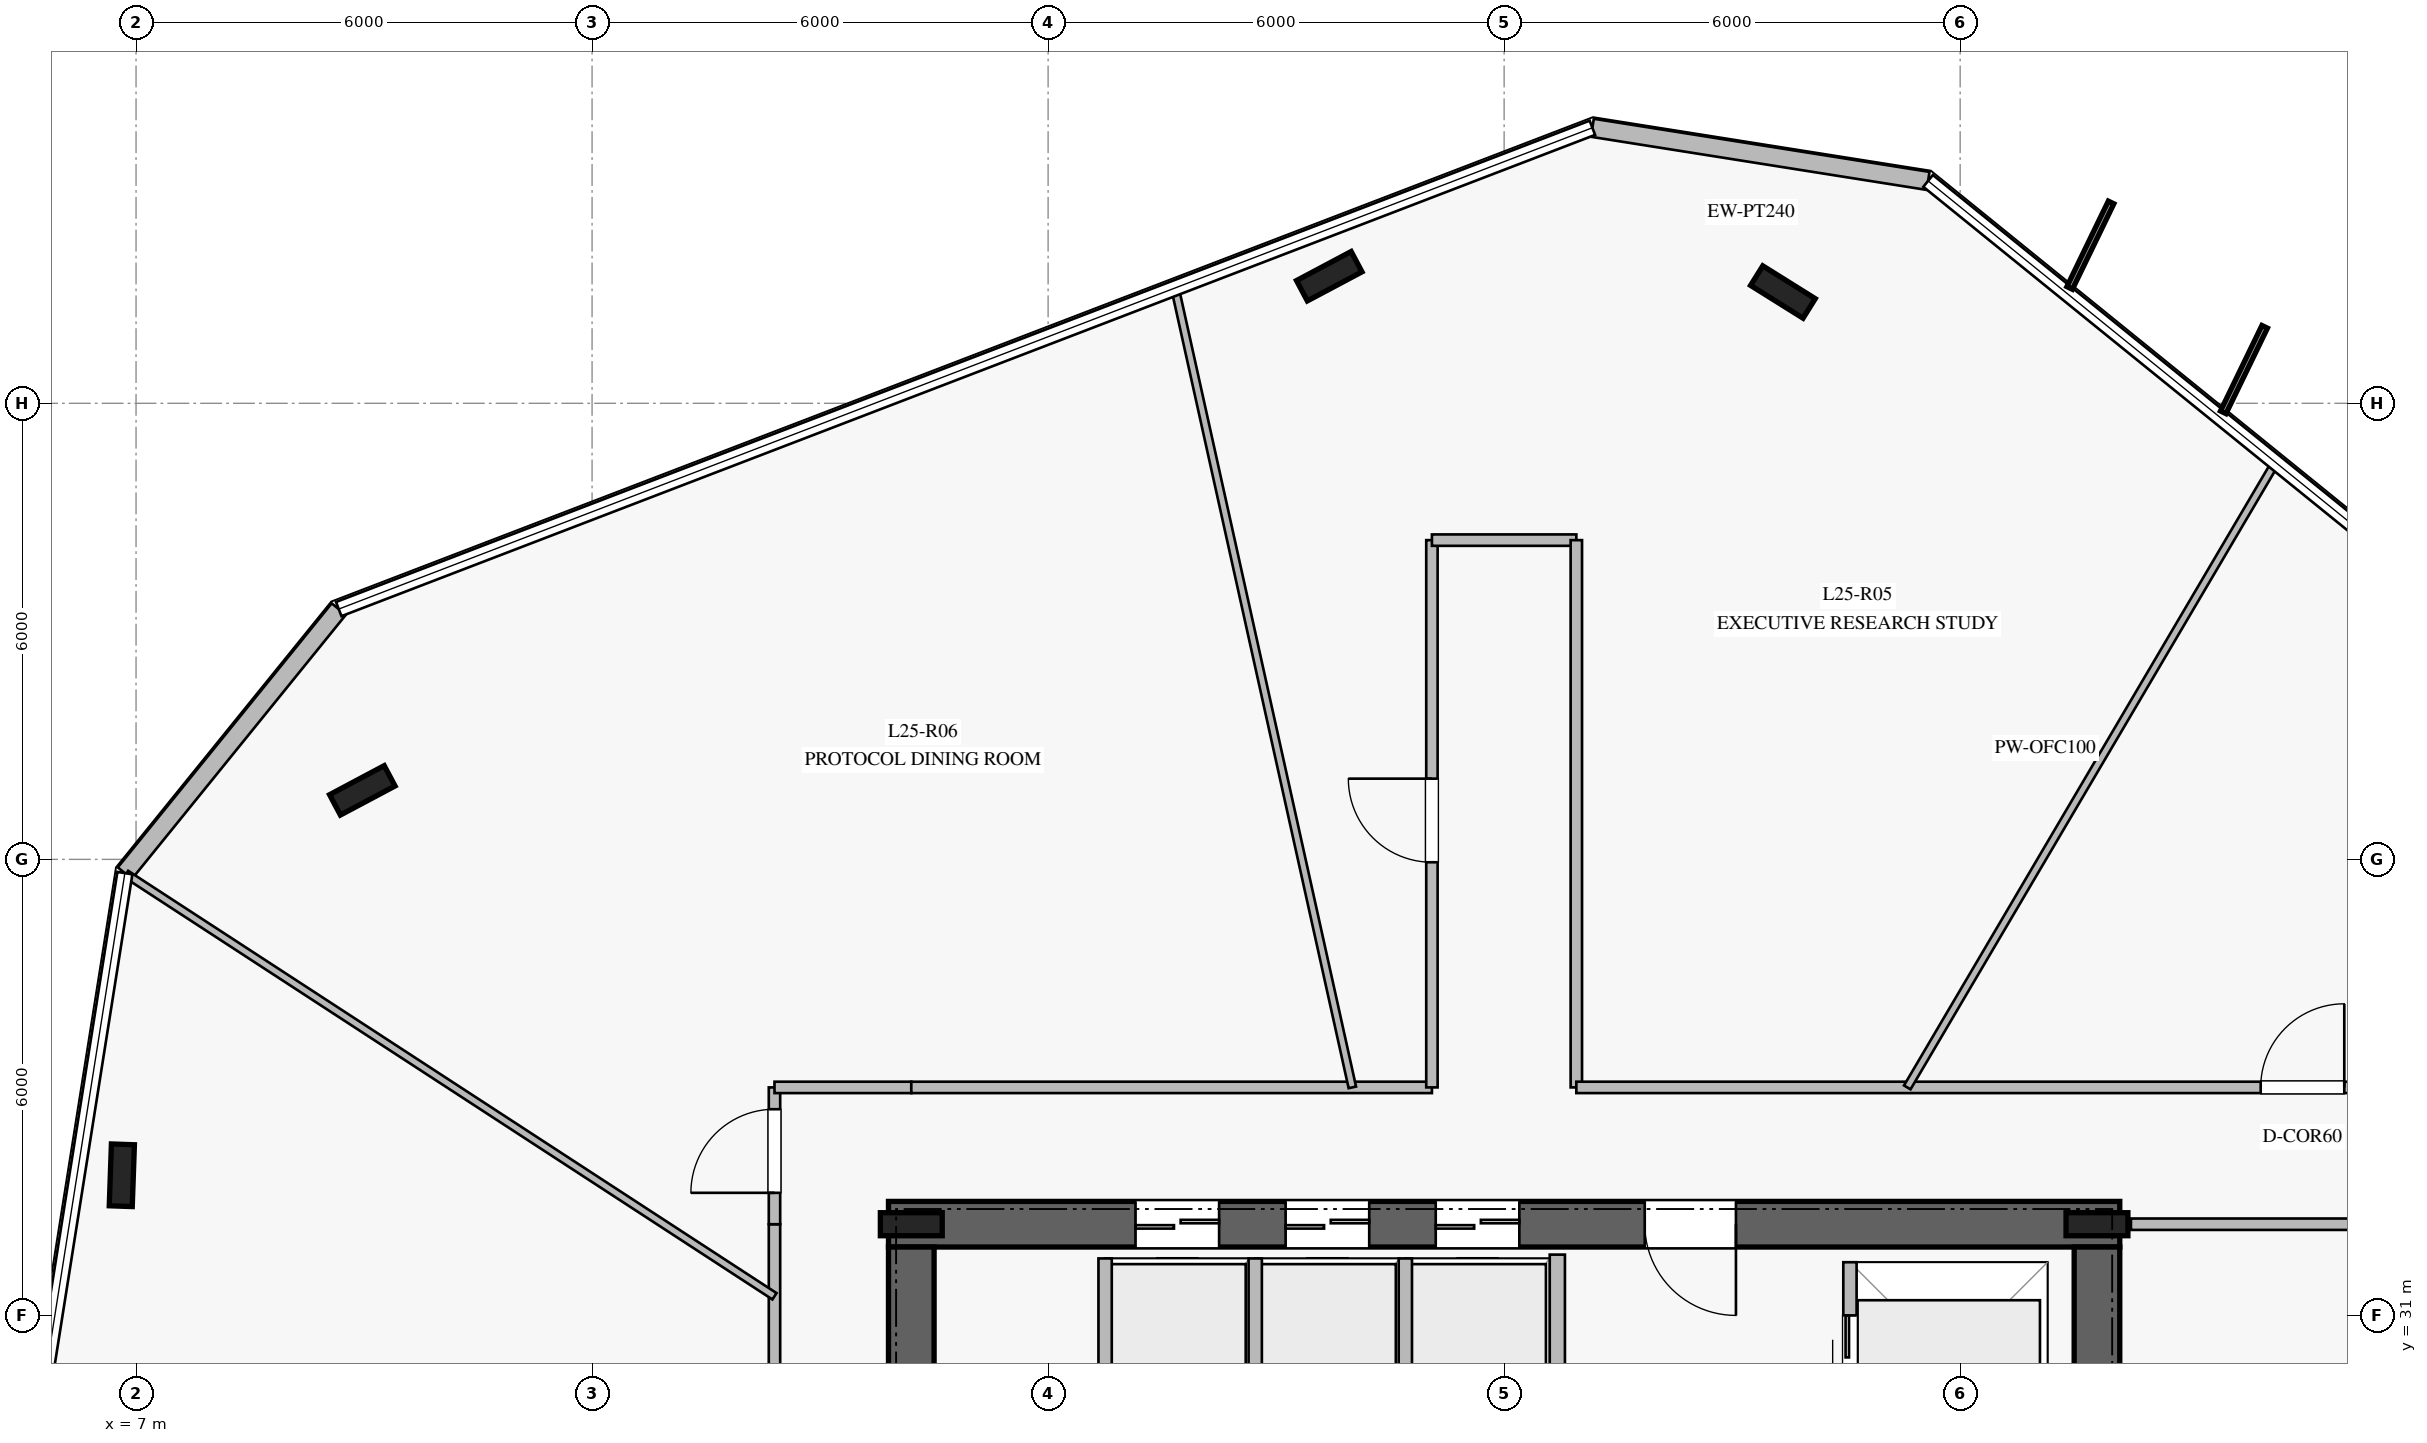
"""IFC4 building model, lengths in metres.
Left out: names, types, materials, properties, quantities, classifications, styles, units other than length and angle.
Written with IfcOpenShell. Run it as: python <this file> out.ifc"""

import sys

from ifc_helpers import new_model, si_unit, direction, frame, frame_2d, origin, origin_2d, place, context, subcontext, project, spatial, rectangle, i_section, extrude, element, fill, save


model = new_model("IFC4")
c1 = context("Model", 3, precision=1e-05, world=origin(), true_north=direction((0.0, 1.0)))
c2 = subcontext(c1, "Body", "Model", "MODEL_VIEW")
j1 = project(units=[si_unit("LENGTHUNIT", "METRE"), si_unit("PLANEANGLEUNIT", "RADIAN")], contexts=[c1])
p1 = place(None, origin())
s1 = spatial("IfcSite", under=j1, at=p1, CompositionType="ELEMENT")
p2 = place(p1, origin())
s2 = spatial("IfcBuilding", under=s1, at=p2, CompositionType="ELEMENT")
p3 = place(p2, frame((0.0, 0.0, 106.4)))
s3 = spatial("IfcBuildingStorey", under=s2, at=p3, CompositionType="ELEMENT", Elevation=106.4)
p4 = place(p3, frame((33.1, 32.2, 0.0), z_axis=(0.0, 0.0, 1.0), x_axis=(-1.0, 0.0, 0.0)))
e1 = element("IfcWall", 1, at=p4, inside=s3, PredefinedType="SHEAR", context=c2, shape_type="SweptSolid", body=[
    extrude(rectangle(XDim=16.2, YDim=0.6, at=frame_2d((8.1, 0.0))), origin(), (0.0, 0.0, 1.0), 3.76),
])
p5 = place(p4, frame((5.05, 0.0, 0.0)))
e2 = element("IfcOpeningElement", 2, at=p5, cuts=e1, PredefinedType="OPENING", context=c2, shape_type="SweptSolid", body=[
    extrude(rectangle(XDim=1.2, YDim=2.25, at=frame_2d((0.6, 1.125))), frame((0.0, 0.31, 0.0), z_axis=(0.0, -1.0, 0.0), x_axis=(1.0, 0.0, 0.0)), (0.0, 0.0, 1.0), 0.62),
])
p6 = place(p4, frame((11.85, 0.0, 0.0)))
e3 = element("IfcOpeningElement", 3, at=p6, cuts=e1, PredefinedType="OPENING", context=c2, shape_type="SweptSolid", body=[
    extrude(rectangle(XDim=1.1, YDim=2.2, at=frame_2d((0.55, 1.1))), frame((0.0, 0.31, 0.0), z_axis=(0.0, -1.0, 0.0), x_axis=(1.0, 0.0, 0.0)), (0.0, 0.0, 1.0), 0.62),
])
p7 = place(p4, frame((9.875, 0.0, 0.0)))
e4 = element("IfcOpeningElement", 4, at=p7, cuts=e1, PredefinedType="OPENING", context=c2, shape_type="SweptSolid", body=[
    extrude(rectangle(XDim=1.1, YDim=2.2, at=frame_2d((0.55, 1.1))), frame((0.0, 0.31, 0.0), z_axis=(0.0, -1.0, 0.0), x_axis=(1.0, 0.0, 0.0)), (0.0, 0.0, 1.0), 0.62),
])
p8 = place(p4, frame((7.9, 0.0, 0.0)))
e5 = element("IfcOpeningElement", 5, at=p8, cuts=e1, PredefinedType="OPENING", context=c2, shape_type="SweptSolid", body=[
    extrude(rectangle(XDim=1.1, YDim=2.2, at=frame_2d((0.55, 1.1))), frame((0.0, 0.31, 0.0), z_axis=(0.0, -1.0, 0.0), x_axis=(1.0, 0.0, 0.0)), (0.0, 0.0, 1.0), 0.62),
])
p9 = place(p3, frame((17.2, 31.9, 0.0), z_axis=(0.0, 0.0, 1.0), x_axis=(0.0, -1.0, 0.0)))
e6 = element("IfcWall", 6, at=p9, inside=s3, PredefinedType="SHEAR", context=c2, shape_type="SweptSolid", body=[
    extrude(rectangle(XDim=13.8, YDim=0.6, at=frame_2d((6.9, 0.0))), origin(), (0.0, 0.0, 1.0), 3.76),
])
p10 = place(p9, frame((2.05, 0.0, 0.0)))
e7 = element("IfcOpeningElement", 7, at=p10, cuts=e6, PredefinedType="OPENING", context=c2, shape_type="SweptSolid", body=[
    extrude(rectangle(XDim=1.5, YDim=2.2, at=frame_2d((0.75, 1.1))), frame((0.0, 0.31, 0.0), z_axis=(0.0, -1.0, 0.0), x_axis=(1.0, 0.0, 0.0)), (0.0, 0.0, 1.0), 0.62),
])
p11 = place(p3, frame((32.8, 18.1, 0.0), z_axis=(0.0, 0.0, 1.0), x_axis=(0.0, 1.0, 0.0)))
e8 = element("IfcWall", 8, at=p11, inside=s3, PredefinedType="SHEAR", context=c2, shape_type="SweptSolid", body=[
    extrude(rectangle(XDim=13.8, YDim=0.6, at=frame_2d((6.9, 0.0))), origin(), (0.0, 0.0, 1.0), 3.76),
])
for number, where, z_axis, x_axis in (
    (9, (32.8, 32.2, 0.0), (0.0, 0.0, 1.0), (1.0, 0.0, 0.0)),
    (10, (17.2, 32.2, 0.0), (0.0, 0.0, 1.0), (1.0, 0.0, 0.0)),
    (11, (28.668, 44.464, 0.0), (0.0, 0.0, 1.0), (-0.848, 0.53, 0.0)),
    (12, (22.699, 44.672, 0.0), (0.0, 0.0, 1.0), (0.883, 0.469, 0.0)),
    (13, (9.977, 37.908, 0.0), (0.0, 0.0, 1.0), (0.883, 0.469, 0.0)),
    (14, (6.813, 32.844, 0.0), (0.0, 0.0, 1.0), (0.035, 0.999, 0.0)),
):
    element("IfcColumn", number, at=place(p3, frame(where, z_axis=z_axis, x_axis=x_axis)), inside=s3, PredefinedType="COLUMN", context=c2, shape_type="SweptSolid", body=[
        extrude(i_section(OverallWidth=0.303, OverallDepth=0.814, WebThickness=0.021, FlangeThickness=0.04, at=origin_2d()), origin(), (0.0, 0.0, 1.0), 4.0),
    ])
p12 = place(p3, frame((30.578, 45.926, 0.0), z_axis=(0.0, 0.0, 1.0), x_axis=(-0.987709346229, 0.156301783012, 0.0)))
e15 = element("IfcWall", 15, at=p12, inside=s3, PredefinedType="STANDARD", context=c2, shape_type="SweptSolid", body=[
    extrude(rectangle(XDim=4.472, YDim=0.24, at=frame_2d((2.236, 0.0))), origin(), (0.0, 0.0, 1.0), 3.76),
])
p13 = place(p3, frame((9.667, 40.293, 0.0), z_axis=(0.0, 0.0, 1.0), x_axis=(-0.629438558802, -0.777050256221, 0.0)))
e16 = element("IfcWall", 16, at=p13, inside=s3, PredefinedType="STANDARD", context=c2, shape_type="SweptSolid", body=[
    extrude(rectangle(XDim=4.471, YDim=0.24, at=frame_2d((2.235, 0.0))), origin(), (0.0, 0.0, 1.0), 3.76),
])
p14 = place(p3, frame((25.7, 26.65, 0.0), z_axis=(0.0, 0.0, 1.0), x_axis=(0.0, 1.0, 0.0)))
e17 = element("IfcWall", 17, at=p14, inside=s3, PredefinedType="PARTITIONING", context=c2, shape_type="SweptSolid", body=[
    extrude(rectangle(XDim=5.15, YDim=0.2, at=frame_2d((2.575, 0.0))), origin(), (0.0, 0.0, 1.0), 3.76),
])
for number, where, z_axis, x_axis in (
    (18, (19.75, 29.4, 0.0), (0.0, 0.0, 1.0), (0.0, 1.0, 0.0)),
    (19, (21.725, 29.4, 0.0), (0.0, 0.0, 1.0), (0.0, 1.0, 0.0)),
    (20, (23.7, 29.4, 0.0), (0.0, 0.0, 1.0), (0.0, 1.0, 0.0)),
):
    element("IfcWall", number, at=place(p3, frame(where, z_axis=z_axis, x_axis=x_axis)), inside=s3, PredefinedType="PARTITIONING", context=c2, shape_type="SweptSolid", body=[
        extrude(rectangle(XDim=2.35, YDim=0.175, at=frame_2d((1.175, 0.0))), origin(), (0.0, 0.0, 1.0), 3.76),
    ])
p15 = place(p3, frame((29.55, 29.1, 0.0), z_axis=(0.0, 0.0, 1.0), x_axis=(0.0, 1.0, 0.0)))
e21 = element("IfcWall", 21, at=p15, inside=s3, PredefinedType="PARTITIONING", context=c2, shape_type="SweptSolid", body=[
    extrude(rectangle(XDim=2.6, YDim=0.175, at=frame_2d((1.3, 0.0))), origin(), (0.0, 0.0, 1.0), 3.76),
])
p16 = place(p15, frame((0.7, 0.0, 0.0)))
e22 = element("IfcOpeningElement", 22, at=p16, cuts=e21, PredefinedType="OPENING", context=c2, shape_type="SweptSolid", body=[
    extrude(rectangle(XDim=1.2, YDim=2.2, at=frame_2d((0.6, 1.1))), frame((0.0, 0.098, 0.0), z_axis=(0.0, -1.0, 0.0), x_axis=(1.0, 0.0, 0.0)), (0.0, 0.0, 1.0), 0.195),
])
p17 = place(p3, frame((15.4, 25.95, 0.0), z_axis=(0.0, 0.0, 1.0), x_axis=(0.0, 1.0, 0.0)))
e23 = element("IfcWall", 23, at=p17, inside=s3, PredefinedType="PARTITIONING", context=c2, shape_type="SweptSolid", body=[
    extrude(rectangle(XDim=6.25, YDim=0.15, at=frame_2d((3.125, 0.0))), origin(), (0.0, 0.0, 1.0), 3.21),
])
p18 = place(p3, frame((15.4, 32.2, 0.0), z_axis=(0.0, 0.0, 1.0), x_axis=(0.0, 1.0, 0.0)))
e24 = element("IfcWall", 24, at=p18, inside=s3, PredefinedType="PARTITIONING", context=c2, shape_type="SweptSolid", body=[
    extrude(rectangle(XDim=1.8, YDim=0.15, at=frame_2d((0.9, 0.0))), origin(), (0.0, 0.0, 1.0), 3.21),
])
p19 = place(p18, frame((0.413, 0.0, 0.0)))
e25 = element("IfcOpeningElement", 25, at=p19, cuts=e24, PredefinedType="OPENING", context=c2, shape_type="SweptSolid", body=[
    extrude(rectangle(XDim=1.1, YDim=2.2, at=frame_2d((0.55, 1.1))), frame((0.0, 0.085, 0.0), z_axis=(0.0, -1.0, 0.0), x_axis=(1.0, 0.0, 0.0)), (0.0, 0.0, 1.0), 0.17),
])
p20 = place(p3, frame((15.4, 34.0, 0.0), z_axis=(0.0, 0.0, 1.0), x_axis=(1.0, 0.0, 0.0)))
e26 = element("IfcWall", 26, at=p20, inside=s3, PredefinedType="PARTITIONING", context=c2, shape_type="SweptSolid", body=[
    extrude(rectangle(XDim=1.8, YDim=0.15, at=frame_2d((0.9, 0.0))), origin(), (0.0, 0.0, 1.0), 3.76),
])
p21 = place(p3, frame((17.2, 34.0, 0.0), z_axis=(0.0, 0.0, 1.0), x_axis=(1.0, 0.0, 0.0)))
e27 = element("IfcWall", 27, at=p21, inside=s3, PredefinedType="PARTITIONING", context=c2, shape_type="SweptSolid", body=[
    extrude(rectangle(XDim=6.85, YDim=0.15, at=frame_2d((3.425, 0.0))), origin(), (0.0, 0.0, 1.0), 3.21),
])
p22 = place(p3, frame((24.05, 34.0, 0.0), z_axis=(0.0, 0.0, 1.0), x_axis=(0.0, 1.0, 0.0)))
e28 = element("IfcWall", 28, at=p22, inside=s3, PredefinedType="PARTITIONING", context=c2, shape_type="SweptSolid", body=[
    extrude(rectangle(XDim=7.2, YDim=0.15, at=frame_2d((3.6, 0.0))), origin(), (0.0, 0.0, 1.0), 3.36),
])
p23 = place(p22, frame((2.962, 0.0, 0.0)))
e29 = element("IfcOpeningElement", 29, at=p23, cuts=e28, PredefinedType="OPENING", context=c2, shape_type="SweptSolid", body=[
    extrude(rectangle(XDim=1.1, YDim=2.2, at=frame_2d((0.55, 1.1))), frame((0.0, 0.085, 0.0), z_axis=(0.0, -1.0, 0.0), x_axis=(1.0, 0.0, 0.0)), (0.0, 0.0, 1.0), 0.17),
])
p24 = place(p3, frame((24.05, 41.2, 0.0), z_axis=(0.0, 0.0, 1.0), x_axis=(1.0, 0.0, 0.0)))
e30 = element("IfcWall", 30, at=p24, inside=s3, PredefinedType="PARTITIONING", context=c2, shape_type="SweptSolid", body=[
    extrude(rectangle(XDim=1.9, YDim=0.15, at=frame_2d((0.95, 0.0))), origin(), (0.0, 0.0, 1.0), 3.76),
])
p25 = place(p3, frame((25.95, 41.2, 0.0), z_axis=(0.0, 0.0, 1.0), x_axis=(0.0, -1.0, 0.0)))
e31 = element("IfcWall", 31, at=p25, inside=s3, PredefinedType="PARTITIONING", context=c2, shape_type="SweptSolid", body=[
    extrude(rectangle(XDim=7.2, YDim=0.15, at=frame_2d((3.6, 0.0))), origin(), (0.0, 0.0, 1.0), 3.36),
])
p26 = place(p3, frame((25.95, 34.0, 0.0), z_axis=(0.0, 0.0, 1.0), x_axis=(1.0, 0.0, 0.0)))
e32 = element("IfcWall", 32, at=p26, inside=s3, PredefinedType="PARTITIONING", context=c2, shape_type="SweptSolid", body=[
    extrude(rectangle(XDim=15.25, YDim=0.15, at=frame_2d((7.625, 0.0))), origin(), (0.0, 0.0, 1.0), 3.21),
])
p27 = place(p26, frame((9.004, 0.0, 0.0)))
e33 = element("IfcOpeningElement", 33, at=p27, cuts=e32, PredefinedType="OPENING", context=c2, shape_type="SweptSolid", body=[
    extrude(rectangle(XDim=1.1, YDim=2.2, at=frame_2d((0.55, 1.1))), frame((0.0, 0.085, 0.0), z_axis=(0.0, -1.0, 0.0), x_axis=(1.0, 0.0, 0.0)), (0.0, 0.0, 1.0), 0.17),
])
p28 = place(p3, frame((41.2, 32.2, 0.0), z_axis=(0.0, 0.0, 1.0), x_axis=(-1.0, 0.0, 0.0)))
e34 = element("IfcWall", 34, at=p28, inside=s3, PredefinedType="PARTITIONING", context=c2, shape_type="SweptSolid", body=[
    extrude(rectangle(XDim=7.953, YDim=0.15, at=frame_2d((3.977, 0.0))), origin(), (0.0, 0.0, 1.0), 3.21),
])
p29 = place(p3, frame((30.304, 34.0, 0.0), z_axis=(0.0, 0.0, 1.0), x_axis=(0.507715403699, 0.861524850975, 0.0)))
e35 = element("IfcWall", 35, at=p29, inside=s3, PredefinedType="MOVABLE", context=c2, shape_type="SweptSolid", body=[
    extrude(rectangle(XDim=9.527, YDim=0.1, at=frame_2d((4.764, 0.0))), origin(), (0.0, 0.0, 1.0), 3.16),
])
p30 = place(p3, frame((23.003, 34.0, 0.0), z_axis=(0.0, 0.0, 1.0), x_axis=(-0.216620399742, 0.97625591031, 0.0)))
e36 = element("IfcWall", 36, at=p30, inside=s3, PredefinedType="MOVABLE", context=c2, shape_type="SweptSolid", body=[
    extrude(rectangle(XDim=10.755, YDim=0.1, at=frame_2d((5.378, 0.0))), origin(), (0.0, 0.0, 1.0), 3.16),
])
p31 = place(p3, frame((15.4, 31.252, 0.0), z_axis=(0.0, 0.0, 1.0), x_axis=(-0.837949628646, 0.545747578878, 0.0)))
e37 = element("IfcWall", 37, at=p31, inside=s3, PredefinedType="MOVABLE", context=c2, shape_type="SweptSolid", body=[
    extrude(rectangle(XDim=10.181, YDim=0.1, at=frame_2d((5.09, 0.0))), origin(), (0.0, 0.0, 1.0), 3.16),
])
p32 = place(p5, origin())
e38 = element("IfcDoor", 38, at=p32, inside=s3, OperationType="SINGLE_SWING_LEFT", PredefinedType="DOOR", context=c2, shape_type="SweptSolid", body=[
    extrude(rectangle(XDim=1.2, YDim=2.25, at=frame_2d((0.6, 1.125))), frame((0.0, 0.025, 0.0), z_axis=(0.0, -1.0, 0.0), x_axis=(1.0, 0.0, 0.0)), (0.0, 0.0, 1.0), 0.05),
])
fill(e2, e38)
p33 = place(p6, origin())
e39 = element("IfcDoor", 39, at=p33, inside=s3, OperationType="DOUBLE_DOOR_SLIDING", PredefinedType="DOOR", context=c2, shape_type="SweptSolid", body=[
    extrude(rectangle(XDim=1.1, YDim=2.2, at=frame_2d((0.55, 1.1))), frame((0.0, 0.025, 0.0), z_axis=(0.0, -1.0, 0.0), x_axis=(1.0, 0.0, 0.0)), (0.0, 0.0, 1.0), 0.05),
])
fill(e3, e39)
p34 = place(p7, origin())
e40 = element("IfcDoor", 40, at=p34, inside=s3, OperationType="DOUBLE_DOOR_SLIDING", PredefinedType="DOOR", context=c2, shape_type="SweptSolid", body=[
    extrude(rectangle(XDim=1.1, YDim=2.2, at=frame_2d((0.55, 1.1))), frame((0.0, 0.025, 0.0), z_axis=(0.0, -1.0, 0.0), x_axis=(1.0, 0.0, 0.0)), (0.0, 0.0, 1.0), 0.05),
])
fill(e4, e40)
p35 = place(p8, origin())
e41 = element("IfcDoor", 41, at=p35, inside=s3, OperationType="DOUBLE_DOOR_SLIDING", PredefinedType="DOOR", context=c2, shape_type="SweptSolid", body=[
    extrude(rectangle(XDim=1.1, YDim=2.2, at=frame_2d((0.55, 1.1))), frame((0.0, 0.025, 0.0), z_axis=(0.0, -1.0, 0.0), x_axis=(1.0, 0.0, 0.0)), (0.0, 0.0, 1.0), 0.05),
])
fill(e5, e41)
p36 = place(p16, origin())
e42 = element("IfcDoor", 42, at=p36, inside=s3, OperationType="DOUBLE_DOOR_SLIDING", PredefinedType="DOOR", context=c2, shape_type="SweptSolid", body=[
    extrude(rectangle(XDim=1.2, YDim=2.2, at=frame_2d((0.6, 1.1))), frame((0.0, 0.025, 0.0), z_axis=(0.0, -1.0, 0.0), x_axis=(1.0, 0.0, 0.0)), (0.0, 0.0, 1.0), 0.05),
])
fill(e22, e42)
p37 = place(p27, origin())
e43 = element("IfcDoor", 43, at=p37, inside=s3, OperationType="SINGLE_SWING_RIGHT", PredefinedType="DOOR", context=c2, shape_type="SweptSolid", body=[
    extrude(rectangle(XDim=1.1, YDim=2.2, at=frame_2d((0.55, 1.1))), frame((0.0, 0.025, 0.0), z_axis=(0.0, -1.0, 0.0), x_axis=(1.0, 0.0, 0.0)), (0.0, 0.0, 1.0), 0.05),
])
fill(e33, e43)
p38 = place(p23, origin())
e44 = element("IfcDoor", 44, at=p38, inside=s3, OperationType="SINGLE_SWING_RIGHT", PredefinedType="DOOR", context=c2, shape_type="SweptSolid", body=[
    extrude(rectangle(XDim=1.1, YDim=2.2, at=frame_2d((0.55, 1.1))), frame((0.0, 0.025, 0.0), z_axis=(0.0, -1.0, 0.0), x_axis=(1.0, 0.0, 0.0)), (0.0, 0.0, 1.0), 0.05),
])
fill(e29, e44)
p39 = place(p19, origin())
e45 = element("IfcDoor", 45, at=p39, inside=s3, OperationType="SINGLE_SWING_LEFT", PredefinedType="DOOR", context=c2, shape_type="SweptSolid", body=[
    extrude(rectangle(XDim=1.1, YDim=2.2, at=frame_2d((0.55, 1.1))), frame((0.0, 0.025, 0.0), z_axis=(0.0, -1.0, 0.0), x_axis=(1.0, 0.0, 0.0)), (0.0, 0.0, 1.0), 0.05),
])
fill(e25, e45)
save(model, sys.argv[1])
